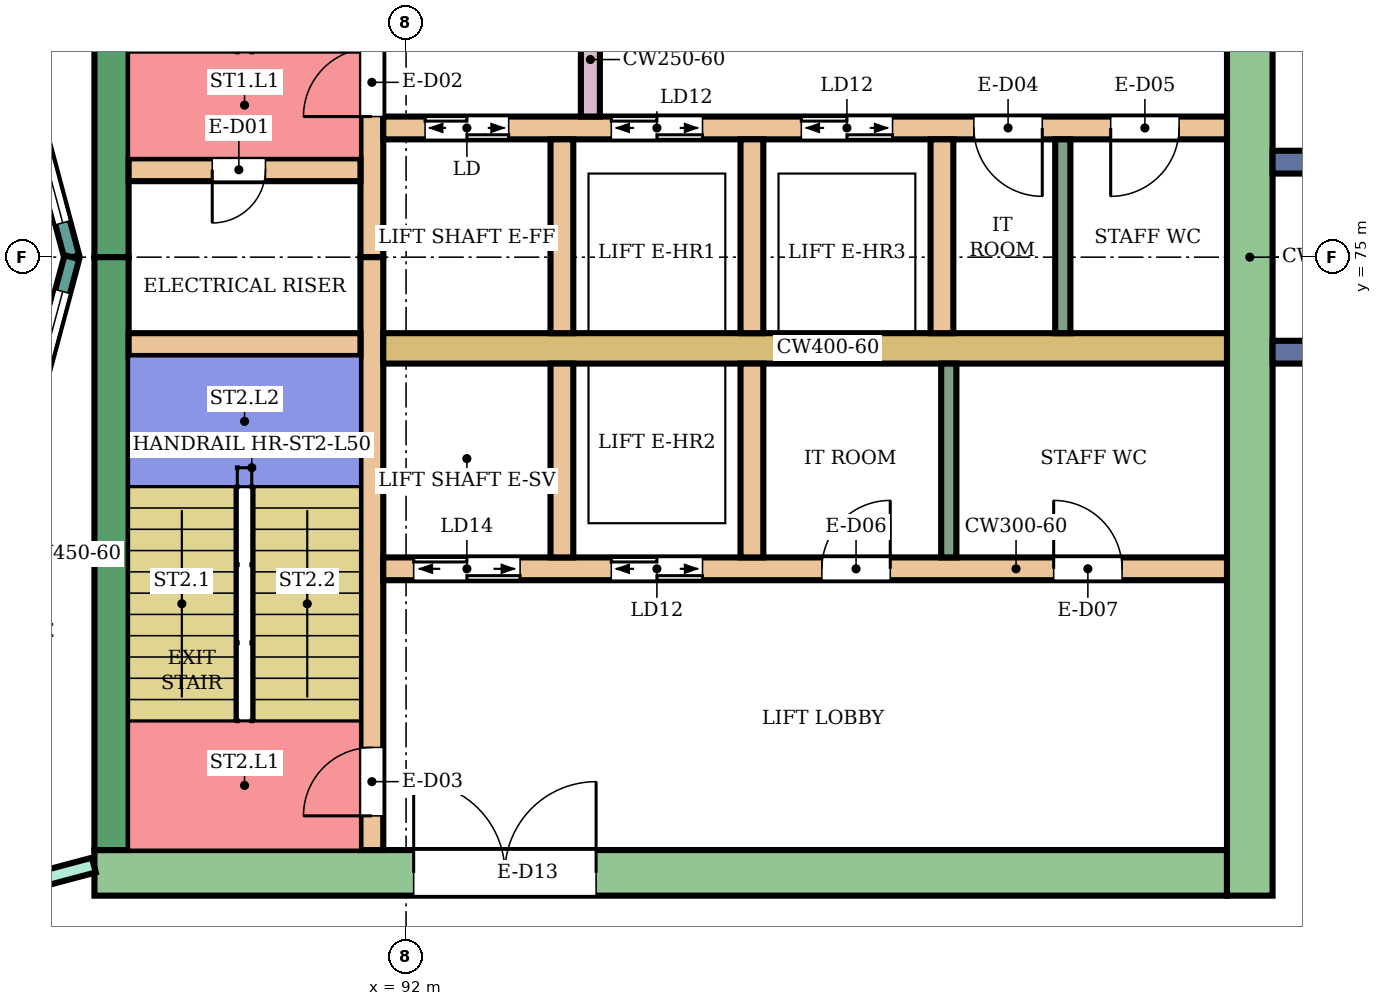
"""IFC4 building model, lengths in metres.
Left out: names, types, materials, properties, quantities, classifications, styles, units other than length and angle.
Written with IfcOpenShell. Run it as: python <this file> out.ifc"""

import sys

from ifc_helpers import new_model, si_unit, direction, frame, frame_2d, origin, place, context, subcontext, project, spatial, rectangle, extrude, element, fill, save


model = new_model("IFC4")
c1 = context("Model", 3, precision=1e-05, world=origin(), true_north=direction((0.0, 1.0)))
c2 = subcontext(c1, "Body", "Model", "MODEL_VIEW")
j1 = project(units=[si_unit("LENGTHUNIT", "METRE"), si_unit("PLANEANGLEUNIT", "RADIAN")], contexts=[c1])
p1 = place(None, origin())
s1 = spatial("IfcSite", under=j1, at=p1, CompositionType="ELEMENT")
p2 = place(p1, origin())
s2 = spatial("IfcBuilding", under=s1, at=p2, CompositionType="ELEMENT")
p3 = place(p2, frame((0.0, 0.0, 216.7)))
s3 = spatial("IfcBuildingStorey", under=s2, at=p3, CompositionType="ELEMENT", Elevation=216.7)
p4 = place(p3, frame((87.9, 66.9, 0.0), z_axis=(0.0, 0.0, 1.0), x_axis=(1.0, 0.0, 0.0)))
e1 = element("IfcWall", 1, at=p4, inside=s3, PredefinedType="SHEAR", context=c2, shape_type="SweptSolid", body=[
    extrude(rectangle(XDim=14.9, YDim=0.6, at=frame_2d((7.45, 0.0))), origin(), (0.0, 0.0, 1.0), 3.88),
])
p5 = place(p4, frame((4.2, 0.0, 0.0)))
e2 = element("IfcOpeningElement", 2, at=p5, cuts=e1, PredefinedType="OPENING", context=c2, shape_type="SweptSolid", body=[
    extrude(rectangle(XDim=2.4, YDim=2.4, at=frame_2d((1.2, 1.2))), frame((0.0, 0.31, 0.0), z_axis=(0.0, -1.0, 0.0), x_axis=(1.0, 0.0, 0.0)), (0.0, 0.0, 1.0), 0.62),
])
for number, where, z_axis, x_axis in (
    (3, (88.125, 75.0, 0.0), (0.0, 0.0, 1.0), (0.0, 1.0, 0.0)),
    (4, (88.125, 67.2, 0.0), (0.0, 0.0, 1.0), (0.0, 1.0, 0.0)),
):
    element("IfcWall", number, at=place(p3, frame(where, z_axis=z_axis, x_axis=x_axis)), inside=s3, PredefinedType="SHEAR", context=c2, shape_type="SweptSolid", body=[
        extrude(rectangle(XDim=7.8, YDim=0.45, at=frame_2d((3.9, 0.0))), origin(), (0.0, 0.0, 1.0), 3.88),
    ])
p6 = place(p3, frame((103.1, 66.6, 0.0), z_axis=(0.0, 0.0, 1.0), x_axis=(0.0, 1.0, 0.0)))
e5 = element("IfcWall", 5, at=p6, inside=s3, PredefinedType="SHEAR", context=c2, shape_type="SweptSolid", body=[
    extrude(rectangle(XDim=16.8, YDim=0.6, at=frame_2d((8.4, 0.0))), origin(), (0.0, 0.0, 1.0), 3.88),
])
p7 = place(p3, frame((91.55, 75.0, 0.0), z_axis=(0.0, 0.0, 1.0), x_axis=(0.0, 1.0, 0.0)))
e6 = element("IfcWall", 6, at=p7, inside=s3, PredefinedType="SHEAR", context=c2, shape_type="SweptSolid", body=[
    extrude(rectangle(XDim=7.8, YDim=0.3, at=frame_2d((3.9, 0.0))), origin(), (0.0, 0.0, 1.0), 3.88),
])
p8 = place(p7, frame((1.85, 0.0, 0.0)))
e7 = element("IfcOpeningElement", 7, at=p8, cuts=e6, PredefinedType="OPENING", context=c2, shape_type="SweptSolid", body=[
    extrude(rectangle(XDim=0.9, YDim=2.1, at=frame_2d((0.45, 1.05))), frame((0.0, 0.16, 0.0), z_axis=(0.0, -1.0, 0.0), x_axis=(1.0, 0.0, 0.0)), (0.0, 0.0, 1.0), 0.32),
])
p9 = place(p3, frame((91.55, 67.2, 0.0), z_axis=(0.0, 0.0, 1.0), x_axis=(0.0, 1.0, 0.0)))
e8 = element("IfcWall", 8, at=p9, inside=s3, PredefinedType="SHEAR", context=c2, shape_type="SweptSolid", body=[
    extrude(rectangle(XDim=7.8, YDim=0.3, at=frame_2d((3.9, 0.0))), origin(), (0.0, 0.0, 1.0), 3.88),
])
p10 = place(p9, frame((0.45, 0.0, 0.0)))
e9 = element("IfcOpeningElement", 9, at=p10, cuts=e8, PredefinedType="OPENING", context=c2, shape_type="SweptSolid", body=[
    extrude(rectangle(XDim=0.9, YDim=2.1, at=frame_2d((0.45, 1.05))), frame((0.0, 0.16, 0.0), z_axis=(0.0, -1.0, 0.0), x_axis=(1.0, 0.0, 0.0)), (0.0, 0.0, 1.0), 0.32),
])
p11 = place(p3, frame((88.35, 76.15, 0.0), z_axis=(0.0, 0.0, 1.0), x_axis=(1.0, 0.0, 0.0)))
e10 = element("IfcWall", 10, at=p11, inside=s3, PredefinedType="SHEAR", context=c2, shape_type="SweptSolid", body=[
    extrude(rectangle(XDim=3.05, YDim=0.3, at=frame_2d((1.525, 0.0))), origin(), (0.0, 0.0, 1.0), 3.88),
])
p12 = place(p11, frame((1.1, 0.0, 0.0)))
e11 = element("IfcOpeningElement", 11, at=p12, cuts=e10, PredefinedType="OPENING", context=c2, shape_type="SweptSolid", body=[
    extrude(rectangle(XDim=0.7, YDim=2.0, at=frame_2d((0.35, 1.0))), frame((0.0, 0.16, 0.0), z_axis=(0.0, -1.0, 0.0), x_axis=(1.0, 0.0, 0.0)), (0.0, 0.0, 1.0), 0.32),
])
p13 = place(p3, frame((88.35, 73.85, 0.0), z_axis=(0.0, 0.0, 1.0), x_axis=(1.0, 0.0, 0.0)))
e12 = element("IfcWall", 12, at=p13, inside=s3, PredefinedType="SHEAR", context=c2, shape_type="SweptSolid", body=[
    extrude(rectangle(XDim=3.05, YDim=0.3, at=frame_2d((1.525, 0.0))), origin(), (0.0, 0.0, 1.0), 3.88),
])
p14 = place(p3, frame((91.7, 76.7, 0.0), z_axis=(0.0, 0.0, 1.0), x_axis=(1.0, 0.0, 0.0)))
e13 = element("IfcWall", 13, at=p14, inside=s3, PredefinedType="SHEAR", context=c2, shape_type="SweptSolid", body=[
    extrude(rectangle(XDim=11.1, YDim=0.3, at=frame_2d((5.55, 0.0))), origin(), (0.0, 0.0, 1.0), 3.88),
])
p15 = place(p14, frame((0.55, 0.0, 0.0)))
e14 = element("IfcOpeningElement", 14, at=p15, cuts=e13, PredefinedType="OPENING", context=c2, shape_type="SweptSolid", body=[
    extrude(rectangle(XDim=1.1, YDim=2.1, at=frame_2d((0.55, 1.05))), frame((0.0, 0.16, 0.0), z_axis=(0.0, -1.0, 0.0), x_axis=(1.0, 0.0, 0.0)), (0.0, 0.0, 1.0), 0.32),
])
p16 = place(p14, frame((3.0, 0.0, 0.0)))
e15 = element("IfcOpeningElement", 15, at=p16, cuts=e13, PredefinedType="OPENING", context=c2, shape_type="SweptSolid", body=[
    extrude(rectangle(XDim=1.2, YDim=2.1, at=frame_2d((0.6, 1.05))), frame((0.0, 0.16, 0.0), z_axis=(0.0, -1.0, 0.0), x_axis=(1.0, 0.0, 0.0)), (0.0, 0.0, 1.0), 0.32),
])
p17 = place(p14, frame((5.5, 0.0, 0.0)))
e16 = element("IfcOpeningElement", 16, at=p17, cuts=e13, PredefinedType="OPENING", context=c2, shape_type="SweptSolid", body=[
    extrude(rectangle(XDim=1.2, YDim=2.1, at=frame_2d((0.6, 1.05))), frame((0.0, 0.16, 0.0), z_axis=(0.0, -1.0, 0.0), x_axis=(1.0, 0.0, 0.0)), (0.0, 0.0, 1.0), 0.32),
])
p18 = place(p14, frame((7.77, 0.0, 0.0)))
e17 = element("IfcOpeningElement", 17, at=p18, cuts=e13, PredefinedType="OPENING", context=c2, shape_type="SweptSolid", body=[
    extrude(rectangle(XDim=0.9, YDim=2.1, at=frame_2d((0.45, 1.05))), frame((0.0, 0.16, 0.0), z_axis=(0.0, -1.0, 0.0), x_axis=(1.0, 0.0, 0.0)), (0.0, 0.0, 1.0), 0.32),
])
p19 = place(p14, frame((9.57, 0.0, 0.0)))
e18 = element("IfcOpeningElement", 18, at=p19, cuts=e13, PredefinedType="OPENING", context=c2, shape_type="SweptSolid", body=[
    extrude(rectangle(XDim=0.9, YDim=2.1, at=frame_2d((0.45, 1.05))), frame((0.0, 0.16, 0.0), z_axis=(0.0, -1.0, 0.0), x_axis=(1.0, 0.0, 0.0)), (0.0, 0.0, 1.0), 0.32),
])
p20 = place(p3, frame((91.7, 73.8, 0.0), z_axis=(0.0, 0.0, 1.0), x_axis=(1.0, 0.0, 0.0)))
e19 = element("IfcWall", 19, at=p20, inside=s3, PredefinedType="SHEAR", context=c2, shape_type="SweptSolid", body=[
    extrude(rectangle(XDim=11.1, YDim=0.4, at=frame_2d((5.55, 0.0))), origin(), (0.0, 0.0, 1.0), 3.88),
])
p21 = place(p3, frame((91.7, 70.9, 0.0), z_axis=(0.0, 0.0, 1.0), x_axis=(1.0, 0.0, 0.0)))
e20 = element("IfcWall", 20, at=p21, inside=s3, PredefinedType="SHEAR", context=c2, shape_type="SweptSolid", body=[
    extrude(rectangle(XDim=11.1, YDim=0.3, at=frame_2d((5.55, 0.0))), origin(), (0.0, 0.0, 1.0), 3.88),
])
p22 = place(p21, frame((0.4, 0.0, 0.0)))
e21 = element("IfcOpeningElement", 21, at=p22, cuts=e20, PredefinedType="OPENING", context=c2, shape_type="SweptSolid", body=[
    extrude(rectangle(XDim=1.4, YDim=2.1, at=frame_2d((0.7, 1.05))), frame((0.0, 0.16, 0.0), z_axis=(0.0, -1.0, 0.0), x_axis=(1.0, 0.0, 0.0)), (0.0, 0.0, 1.0), 0.32),
])
p23 = place(p21, frame((3.0, 0.0, 0.0)))
e22 = element("IfcOpeningElement", 22, at=p23, cuts=e20, PredefinedType="OPENING", context=c2, shape_type="SweptSolid", body=[
    extrude(rectangle(XDim=1.2, YDim=2.1, at=frame_2d((0.6, 1.05))), frame((0.0, 0.16, 0.0), z_axis=(0.0, -1.0, 0.0), x_axis=(1.0, 0.0, 0.0)), (0.0, 0.0, 1.0), 0.32),
])
p24 = place(p21, frame((5.77, 0.0, 0.0)))
e23 = element("IfcOpeningElement", 23, at=p24, cuts=e20, PredefinedType="OPENING", context=c2, shape_type="SweptSolid", body=[
    extrude(rectangle(XDim=0.9, YDim=2.1, at=frame_2d((0.45, 1.05))), frame((0.0, 0.16, 0.0), z_axis=(0.0, -1.0, 0.0), x_axis=(1.0, 0.0, 0.0)), (0.0, 0.0, 1.0), 0.32),
])
p25 = place(p21, frame((8.82, 0.0, 0.0)))
e24 = element("IfcOpeningElement", 24, at=p25, cuts=e20, PredefinedType="OPENING", context=c2, shape_type="SweptSolid", body=[
    extrude(rectangle(XDim=0.9, YDim=2.1, at=frame_2d((0.45, 1.05))), frame((0.0, 0.16, 0.0), z_axis=(0.0, -1.0, 0.0), x_axis=(1.0, 0.0, 0.0)), (0.0, 0.0, 1.0), 0.32),
])
for number, where, z_axis, x_axis in (
    (25, (94.05, 74.0, 0.0), (0.0, 0.0, 1.0), (0.0, 1.0, 0.0)),
    (26, (96.55, 74.0, 0.0), (0.0, 0.0, 1.0), (0.0, 1.0, 0.0)),
    (27, (99.05, 74.0, 0.0), (0.0, 0.0, 1.0), (0.0, 1.0, 0.0)),
    (28, (94.05, 71.05, 0.0), (0.0, 0.0, 1.0), (0.0, 1.0, 0.0)),
    (29, (96.55, 71.05, 0.0), (0.0, 0.0, 1.0), (0.0, 1.0, 0.0)),
):
    element("IfcWall", number, at=place(p3, frame(where, z_axis=z_axis, x_axis=x_axis)), inside=s3, PredefinedType="SHEAR", context=c2, shape_type="SweptSolid", body=[
        extrude(rectangle(XDim=2.55, YDim=0.3, at=frame_2d((1.275, 0.0))), origin(), (0.0, 0.0, 1.0), 3.88),
    ])
p26 = place(p3, frame((94.425, 76.85, 0.0), z_axis=(0.0, 0.0, 1.0), x_axis=(0.0, 1.0, 0.0)))
e30 = element("IfcWall", 30, at=p26, inside=s3, PredefinedType="SHEAR", context=c2, shape_type="SweptSolid", body=[
    extrude(rectangle(XDim=1.5, YDim=0.25, at=frame_2d((0.75, 0.0))), origin(), (0.0, 0.0, 1.0), 3.88),
])
for number, where, z_axis, x_axis in (
    (31, (103.4, 73.75, 0.0), (0.0, 0.0, 1.0), (1.0, 0.0, 0.0)),
    (32, (103.4, 76.25, 0.0), (0.0, 0.0, 1.0), (1.0, 0.0, 0.0)),
):
    element("IfcWall", number, at=place(p3, frame(where, z_axis=z_axis, x_axis=x_axis)), inside=s3, PredefinedType="NOTDEFINED", context=c2, shape_type="SweptSolid", body=[
        extrude(rectangle(XDim=2.416, YDim=0.3, at=frame_2d((1.208, 0.0))), origin(), (0.0, 0.0, 1.0), 4.2),
    ])
p27 = place(p3, frame((87.604, 75.0, 0.0), z_axis=(0.0, 0.0, 1.0), x_axis=(-0.258789828301, 0.965933654434, 0.0)))
e33 = element("IfcWall", 33, at=p27, inside=s3, PredefinedType="NOTDEFINED", context=c2, shape_type="SweptSolid", body=[
    extrude(rectangle(XDim=3.936, YDim=0.2, at=frame_2d((1.968, 0.0))), origin(), (0.0, 0.0, 1.0), 4.2),
])
p28 = place(p27, frame((0.468, 0.0, 0.9)))
e34 = element("IfcOpeningElement", 34, at=p28, cuts=e33, PredefinedType="OPENING", context=c2, shape_type="SweptSolid", body=[
    extrude(rectangle(XDim=3.0, YDim=2.3, at=frame_2d((1.5, 1.15))), frame((0.0, 0.11, 0.0), z_axis=(0.0, -1.0, 0.0), x_axis=(1.0, 0.0, 0.0)), (0.0, 0.0, 1.0), 0.22),
])
p29 = place(p3, frame((86.585, 71.198, 0.0), z_axis=(0.0, 0.0, 1.0), x_axis=(0.258789828301, 0.965933654434, 0.0)))
e35 = element("IfcWall", 35, at=p29, inside=s3, PredefinedType="NOTDEFINED", context=c2, shape_type="SweptSolid", body=[
    extrude(rectangle(XDim=3.936, YDim=0.2, at=frame_2d((1.968, 0.0))), origin(), (0.0, 0.0, 1.0), 4.2),
])
p30 = place(p29, frame((0.468, 0.0, 0.9)))
e36 = element("IfcOpeningElement", 36, at=p30, cuts=e35, PredefinedType="OPENING", context=c2, shape_type="SweptSolid", body=[
    extrude(rectangle(XDim=3.0, YDim=2.3, at=frame_2d((1.5, 1.15))), frame((0.0, 0.11, 0.0), z_axis=(0.0, -1.0, 0.0), x_axis=(1.0, 0.0, 0.0)), (0.0, 0.0, 1.0), 0.22),
])
p31 = place(p3, frame((80.0, 64.898, 0.0), z_axis=(0.0, 0.0, 1.0), x_axis=(0.966237419782, 0.257653349704, 0.0)))
e37 = element("IfcWall", 37, at=p31, inside=s3, PredefinedType="PARTITIONING", context=c2, shape_type="SweptSolid", body=[
    extrude(rectangle(XDim=8.169, YDim=0.2, at=frame_2d((4.084, 0.0))), origin(), (0.0, 0.0, 1.0), 3.75),
])
p32 = place(p31, frame((6.428, 0.0, 0.0)))
e38 = element("IfcOpeningElement", 38, at=p32, cuts=e37, PredefinedType="OPENING", context=c2, shape_type="SweptSolid", body=[
    extrude(rectangle(XDim=0.9, YDim=2.1, at=frame_2d((0.45, 1.05))), frame((0.0, 0.11, 0.0), z_axis=(0.0, -1.0, 0.0), x_axis=(1.0, 0.0, 0.0)), (0.0, 0.0, 1.0), 0.22),
])
for number, where, z_axis, x_axis in (
    (39, (100.64, 74.0, 0.0), (0.0, 0.0, 1.0), (0.0, 1.0, 0.0)),
    (40, (99.14, 71.05, 0.0), (0.0, 0.0, 1.0), (0.0, 1.0, 0.0)),
):
    element("IfcWall", number, at=place(p3, frame(where, z_axis=z_axis, x_axis=x_axis)), inside=s3, PredefinedType="PARTITIONING", context=c2, shape_type="SweptSolid", body=[
        extrude(rectangle(XDim=2.55, YDim=0.2, at=frame_2d((1.275, 0.0))), origin(), (0.0, 0.0, 1.0), 3.88),
    ])
p33 = place(p28, origin())
e41 = element("IfcWindow", 41, at=p33, inside=s3, PartitioningType="SINGLE_PANEL", PredefinedType="WINDOW", context=c2, shape_type="SweptSolid", body=[
    extrude(rectangle(XDim=3.0, YDim=2.3, at=frame_2d((1.5, 1.15))), frame((0.0, 0.03, 0.0), z_axis=(0.0, -1.0, 0.0), x_axis=(1.0, 0.0, 0.0)), (0.0, 0.0, 1.0), 0.06),
])
fill(e34, e41)
p34 = place(p30, origin())
e42 = element("IfcWindow", 42, at=p34, inside=s3, PartitioningType="SINGLE_PANEL", PredefinedType="WINDOW", context=c2, shape_type="SweptSolid", body=[
    extrude(rectangle(XDim=3.0, YDim=2.3, at=frame_2d((1.5, 1.15))), frame((0.0, 0.03, 0.0), z_axis=(0.0, -1.0, 0.0), x_axis=(1.0, 0.0, 0.0)), (0.0, 0.0, 1.0), 0.06),
])
fill(e36, e42)
p35 = place(p12, frame((0.7, 0.0, 0.0), z_axis=(0.0, 0.0, 1.0), x_axis=(-1.0, 0.0, 0.0)))
e43 = element("IfcDoor", 43, at=p35, inside=s3, OperationType="SINGLE_SWING_RIGHT", PredefinedType="DOOR", context=c2, shape_type="SweptSolid", body=[
    extrude(rectangle(XDim=0.7, YDim=2.0, at=frame_2d((0.35, 1.0))), frame((0.0, 0.025, 0.0), z_axis=(0.0, -1.0, 0.0), x_axis=(1.0, 0.0, 0.0)), (0.0, 0.0, 1.0), 0.05),
])
fill(e11, e43)
p36 = place(p8, origin())
e44 = element("IfcDoor", 44, at=p36, inside=s3, OperationType="SINGLE_SWING_LEFT", PredefinedType="DOOR", context=c2, shape_type="SweptSolid", body=[
    extrude(rectangle(XDim=0.9, YDim=2.1, at=frame_2d((0.45, 1.05))), frame((0.0, 0.025, 0.0), z_axis=(0.0, -1.0, 0.0), x_axis=(1.0, 0.0, 0.0)), (0.0, 0.0, 1.0), 0.05),
])
fill(e7, e44)
p37 = place(p10, origin())
e45 = element("IfcDoor", 45, at=p37, inside=s3, OperationType="SINGLE_SWING_LEFT", PredefinedType="DOOR", context=c2, shape_type="SweptSolid", body=[
    extrude(rectangle(XDim=0.9, YDim=2.1, at=frame_2d((0.45, 1.05))), frame((0.0, 0.025, 0.0), z_axis=(0.0, -1.0, 0.0), x_axis=(1.0, 0.0, 0.0)), (0.0, 0.0, 1.0), 0.05),
])
fill(e9, e45)
p38 = place(p15, origin())
e46 = element("IfcDoor", 46, at=p38, inside=s3, OperationType="DOUBLE_DOOR_SLIDING", PredefinedType="DOOR", context=c2, shape_type="SweptSolid", body=[
    extrude(rectangle(XDim=1.1, YDim=2.1, at=frame_2d((0.55, 1.05))), frame((0.0, 0.025, 0.0), z_axis=(0.0, -1.0, 0.0), x_axis=(1.0, 0.0, 0.0)), (0.0, 0.0, 1.0), 0.05),
])
fill(e14, e46)
p39 = place(p16, origin())
e47 = element("IfcDoor", 47, at=p39, inside=s3, OperationType="DOUBLE_DOOR_SLIDING", PredefinedType="DOOR", context=c2, shape_type="SweptSolid", body=[
    extrude(rectangle(XDim=1.2, YDim=2.1, at=frame_2d((0.6, 1.05))), frame((0.0, 0.025, 0.0), z_axis=(0.0, -1.0, 0.0), x_axis=(1.0, 0.0, 0.0)), (0.0, 0.0, 1.0), 0.05),
])
fill(e15, e47)
p40 = place(p17, origin())
e48 = element("IfcDoor", 48, at=p40, inside=s3, OperationType="DOUBLE_DOOR_SLIDING", PredefinedType="DOOR", context=c2, shape_type="SweptSolid", body=[
    extrude(rectangle(XDim=1.2, YDim=2.1, at=frame_2d((0.6, 1.05))), frame((0.0, 0.025, 0.0), z_axis=(0.0, -1.0, 0.0), x_axis=(1.0, 0.0, 0.0)), (0.0, 0.0, 1.0), 0.05),
])
fill(e16, e48)
p41 = place(p18, frame((0.9, 0.0, 0.0), z_axis=(0.0, 0.0, 1.0), x_axis=(-1.0, 0.0, 0.0)))
e49 = element("IfcDoor", 49, at=p41, inside=s3, OperationType="SINGLE_SWING_LEFT", PredefinedType="DOOR", context=c2, shape_type="SweptSolid", body=[
    extrude(rectangle(XDim=0.9, YDim=2.1, at=frame_2d((0.45, 1.05))), frame((0.0, 0.025, 0.0), z_axis=(0.0, -1.0, 0.0), x_axis=(1.0, 0.0, 0.0)), (0.0, 0.0, 1.0), 0.05),
])
fill(e17, e49)
p42 = place(p19, frame((0.9, 0.0, 0.0), z_axis=(0.0, 0.0, 1.0), x_axis=(-1.0, 0.0, 0.0)))
e50 = element("IfcDoor", 50, at=p42, inside=s3, OperationType="SINGLE_SWING_RIGHT", PredefinedType="DOOR", context=c2, shape_type="SweptSolid", body=[
    extrude(rectangle(XDim=0.9, YDim=2.1, at=frame_2d((0.45, 1.05))), frame((0.0, 0.025, 0.0), z_axis=(0.0, -1.0, 0.0), x_axis=(1.0, 0.0, 0.0)), (0.0, 0.0, 1.0), 0.05),
])
fill(e18, e50)
p43 = place(p22, origin())
e51 = element("IfcDoor", 51, at=p43, inside=s3, OperationType="DOUBLE_DOOR_SLIDING", PredefinedType="DOOR", context=c2, shape_type="SweptSolid", body=[
    extrude(rectangle(XDim=1.4, YDim=2.1, at=frame_2d((0.7, 1.05))), frame((0.0, 0.025, 0.0), z_axis=(0.0, -1.0, 0.0), x_axis=(1.0, 0.0, 0.0)), (0.0, 0.0, 1.0), 0.05),
])
fill(e21, e51)
p44 = place(p23, origin())
e52 = element("IfcDoor", 52, at=p44, inside=s3, OperationType="DOUBLE_DOOR_SLIDING", PredefinedType="DOOR", context=c2, shape_type="SweptSolid", body=[
    extrude(rectangle(XDim=1.2, YDim=2.1, at=frame_2d((0.6, 1.05))), frame((0.0, 0.025, 0.0), z_axis=(0.0, -1.0, 0.0), x_axis=(1.0, 0.0, 0.0)), (0.0, 0.0, 1.0), 0.05),
])
fill(e22, e52)
p45 = place(p24, origin())
e53 = element("IfcDoor", 53, at=p45, inside=s3, OperationType="SINGLE_SWING_RIGHT", PredefinedType="DOOR", context=c2, shape_type="SweptSolid", body=[
    extrude(rectangle(XDim=0.9, YDim=2.1, at=frame_2d((0.45, 1.05))), frame((0.0, 0.025, 0.0), z_axis=(0.0, -1.0, 0.0), x_axis=(1.0, 0.0, 0.0)), (0.0, 0.0, 1.0), 0.05),
])
fill(e23, e53)
p46 = place(p25, origin())
e54 = element("IfcDoor", 54, at=p46, inside=s3, OperationType="SINGLE_SWING_LEFT", PredefinedType="DOOR", context=c2, shape_type="SweptSolid", body=[
    extrude(rectangle(XDim=0.9, YDim=2.1, at=frame_2d((0.45, 1.05))), frame((0.0, 0.025, 0.0), z_axis=(0.0, -1.0, 0.0), x_axis=(1.0, 0.0, 0.0)), (0.0, 0.0, 1.0), 0.05),
])
fill(e24, e54)
p47 = place(p5, origin())
e55 = element("IfcDoor", 55, at=p47, inside=s3, OperationType="DOUBLE_DOOR_SINGLE_SWING", PredefinedType="DOOR", context=c2, shape_type="SweptSolid", body=[
    extrude(rectangle(XDim=2.4, YDim=2.4, at=frame_2d((1.2, 1.2))), frame((0.0, 0.025, 0.0), z_axis=(0.0, -1.0, 0.0), x_axis=(1.0, 0.0, 0.0)), (0.0, 0.0, 1.0), 0.05),
])
fill(e2, e55)
save(model, sys.argv[1])
